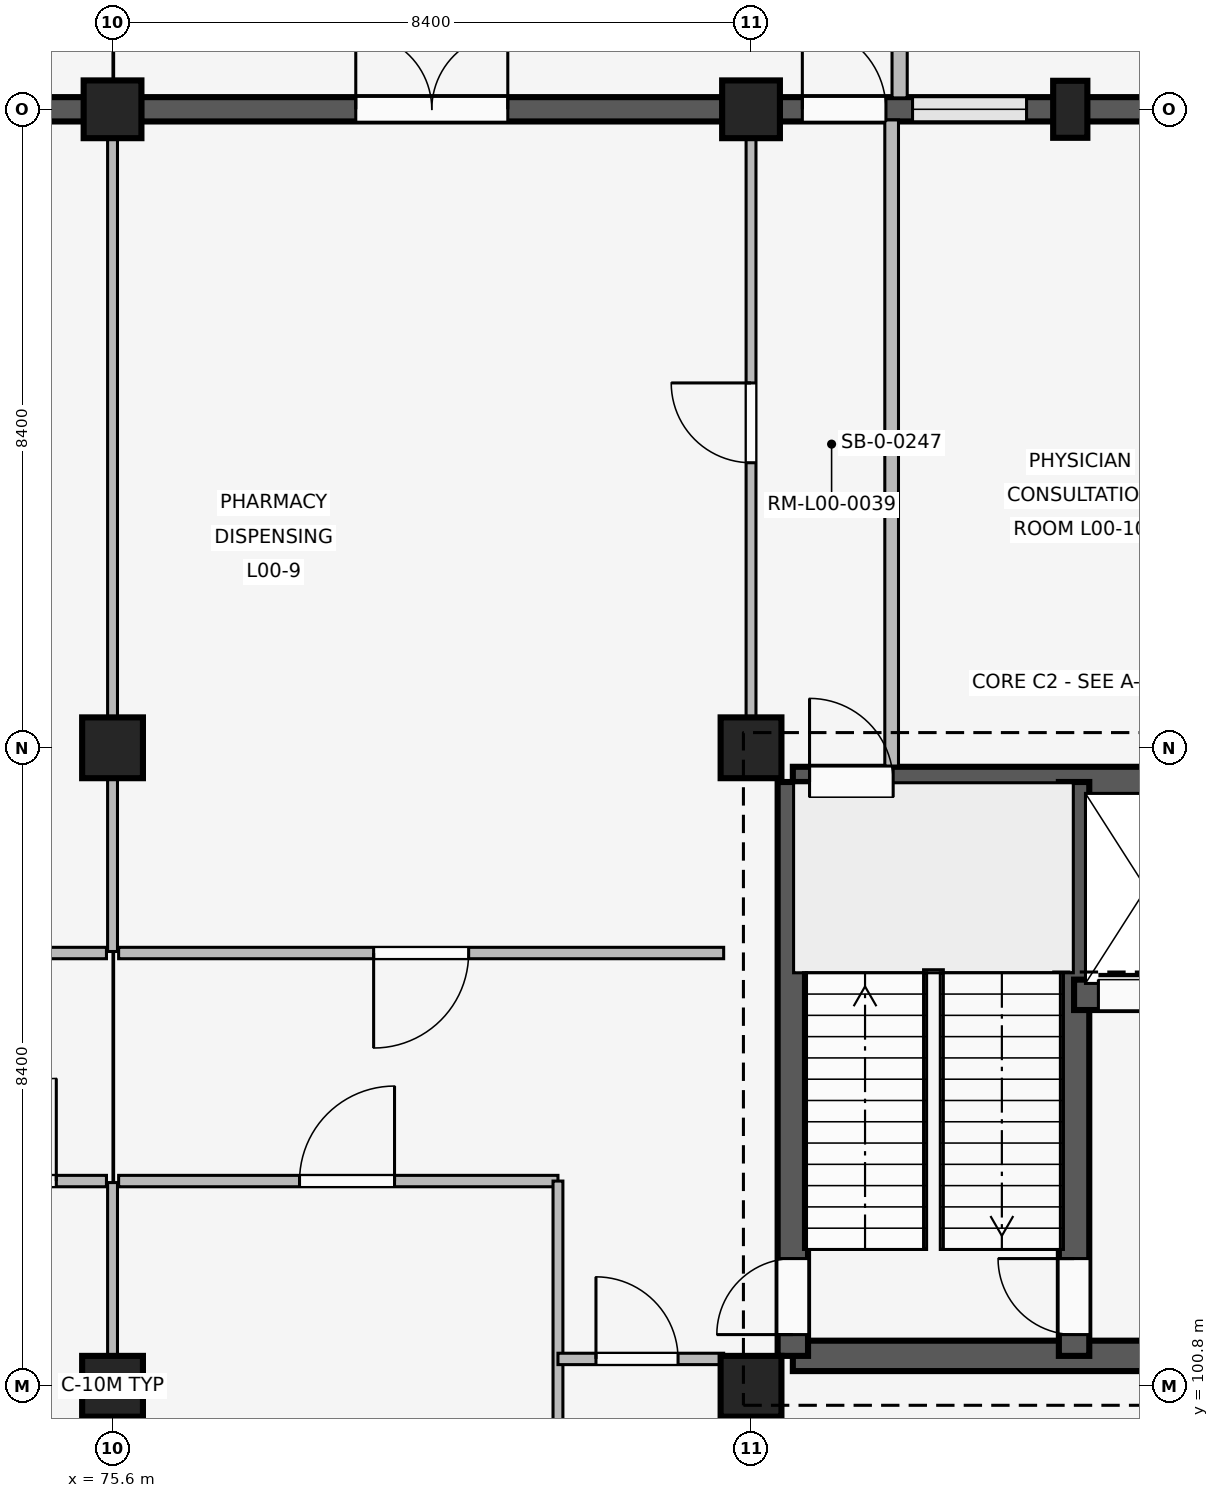
"""IFC4 building model, lengths in metres.
Left out: names, types, materials, properties, quantities, classifications, styles, units other than length and angle.
Written with IfcOpenShell. Run it as: python <this file> out.ifc"""

import sys

from ifc_helpers import new_model, si_unit, direction, frame, frame_2d, origin, origin_2d, place, context, subcontext, project, spatial, rectangle, extrude, element, fill, save


model = new_model("IFC4")
c1 = context("Model", 3, precision=1e-05, world=origin(), true_north=direction((0.0, 1.0)))
c2 = subcontext(c1, "Body", "Model", "MODEL_VIEW")
j1 = project(units=[si_unit("LENGTHUNIT", "METRE"), si_unit("PLANEANGLEUNIT", "RADIAN")], contexts=[c1])
p1 = place(None, origin())
s1 = spatial("IfcSite", under=j1, at=p1, CompositionType="ELEMENT")
p2 = place(p1, origin())
s2 = spatial("IfcBuilding", under=s1, at=p2, CompositionType="ELEMENT")
p3 = place(p2, origin())
s3 = spatial("IfcBuildingStorey", under=s2, at=p3, CompositionType="ELEMENT", Elevation=0.0)
for number, where, z_axis, x_axis in (
    (1, (75.6, 100.8, 0.0), (0.0, 0.0, 1.0), (1.0, 0.0, 0.0)),
    (2, (75.6, 109.2, 0.0), (0.0, 0.0, 1.0), (1.0, 0.0, 0.0)),
):
    element("IfcColumn", number, at=place(p3, frame(where, z_axis=z_axis, x_axis=x_axis)), inside=s3, PredefinedType="COLUMN", context=c2, shape_type="SweptSolid", body=[
        extrude(rectangle(XDim=0.8, YDim=0.8, at=origin_2d()), origin(), (0.0, 0.0, 1.0), 4.8),
    ])
p4 = place(p3, frame((75.6, 117.6, 0.0), z_axis=(0.0, 0.0, 1.0), x_axis=(1.0, 0.0, 0.0)))
e3 = element("IfcColumn", 3, at=p4, inside=s3, PredefinedType="COLUMN", context=c2, shape_type="SweptSolid", body=[
    extrude(rectangle(XDim=0.76, YDim=0.76, at=origin_2d()), origin(), (0.0, 0.0, 1.0), 4.8),
])
for number, where, z_axis, x_axis in (
    (4, (84.0, 100.8, 0.0), (0.0, 0.0, 1.0), (1.0, 0.0, 0.0)),
    (5, (84.0, 109.2, 0.0), (0.0, 0.0, 1.0), (1.0, 0.0, 0.0)),
):
    element("IfcColumn", number, at=place(p3, frame(where, z_axis=z_axis, x_axis=x_axis)), inside=s3, PredefinedType="COLUMN", context=c2, shape_type="SweptSolid", body=[
        extrude(rectangle(XDim=0.8, YDim=0.8, at=origin_2d()), origin(), (0.0, 0.0, 1.0), 4.8),
    ])
p5 = place(p3, frame((84.0, 117.6, 0.0), z_axis=(0.0, 0.0, 1.0), x_axis=(1.0, 0.0, 0.0)))
e6 = element("IfcColumn", 6, at=p5, inside=s3, PredefinedType="COLUMN", context=c2, shape_type="SweptSolid", body=[
    extrude(rectangle(XDim=0.76, YDim=0.76, at=origin_2d()), origin(), (0.0, 0.0, 1.0), 4.8),
])
p6 = place(p3, frame((88.2, 117.6, 0.0), z_axis=(0.0, 0.0, 1.0), x_axis=(1.0, 0.0, 0.0)))
e7 = element("IfcColumn", 7, at=p6, inside=s3, PredefinedType="PILASTER", context=c2, shape_type="SweptSolid", body=[
    extrude(rectangle(XDim=0.45, YDim=0.75, at=origin_2d()), origin(), (0.0, 0.0, 1.0), 4.8),
])
p7 = place(p3, frame((67.575, 117.6, 0.0), z_axis=(0.0, 0.0, 1.0), x_axis=(1.0, 0.0, 0.0)))
e8 = element("IfcWall", 8, at=p7, inside=s3, PredefinedType="SOLIDWALL", context=c2, shape_type="SweptSolid", body=[
    extrude(rectangle(XDim=7.65, YDim=0.32, at=frame_2d((3.825, 0.0))), origin(), (0.0, 0.0, 1.0), 3.82),
])
p8 = place(p7, frame((1.179, 0.0, 0.85)))
e9 = element("IfcOpeningElement", 9, at=p8, cuts=e8, PredefinedType="OPENING", context=c2, shape_type="SweptSolid", body=[
    extrude(rectangle(XDim=1.16, YDim=1.48, at=frame_2d((0.58, 0.74))), frame((0.0, 0.17, 0.0), z_axis=(0.0, -1.0, 0.0), x_axis=(1.0, 0.0, 0.0)), (0.0, 0.0, 1.0), 0.34),
])
p9 = place(p7, frame((5.311, 0.0, 0.85)))
e10 = element("IfcOpeningElement", 10, at=p9, cuts=e8, PredefinedType="OPENING", context=c2, shape_type="SweptSolid", body=[
    extrude(rectangle(XDim=1.16, YDim=1.48, at=frame_2d((0.58, 0.74))), frame((0.0, 0.17, 0.0), z_axis=(0.0, -1.0, 0.0), x_axis=(1.0, 0.0, 0.0)), (0.0, 0.0, 1.0), 0.34),
])
p10 = place(p3, frame((75.975, 117.6, 0.0), z_axis=(0.0, 0.0, 1.0), x_axis=(1.0, 0.0, 0.0)))
e11 = element("IfcWall", 11, at=p10, inside=s3, PredefinedType="SOLIDWALL", context=c2, shape_type="SweptSolid", body=[
    extrude(rectangle(XDim=7.65, YDim=0.32, at=frame_2d((3.825, 0.0))), origin(), (0.0, 0.0, 1.0), 3.82),
])
p11 = place(p10, frame((2.825, 0.0, 0.0)))
e12 = element("IfcOpeningElement", 12, at=p11, cuts=e11, PredefinedType="OPENING", context=c2, shape_type="SweptSolid", body=[
    extrude(rectangle(XDim=2.0, YDim=2.4, at=frame_2d((1.0, 1.2))), frame((0.0, 0.17, 0.0), z_axis=(0.0, -1.0, 0.0), x_axis=(1.0, 0.0, 0.0)), (0.0, 0.0, 1.0), 0.34),
])
p12 = place(p3, frame((84.375, 117.6, 0.0), z_axis=(0.0, 0.0, 1.0), x_axis=(1.0, 0.0, 0.0)))
e13 = element("IfcWall", 13, at=p12, inside=s3, PredefinedType="SOLIDWALL", context=c2, shape_type="SweptSolid", body=[
    extrude(rectangle(XDim=7.65, YDim=0.32, at=frame_2d((3.825, 0.0))), origin(), (0.0, 0.0, 1.0), 3.82),
])
p13 = place(p12, frame((0.3, 0.0, 0.0)))
e14 = element("IfcOpeningElement", 14, at=p13, cuts=e13, PredefinedType="OPENING", context=c2, shape_type="SweptSolid", body=[
    extrude(rectangle(XDim=1.1, YDim=2.15, at=frame_2d((0.55, 1.075))), frame((0.0, 0.17, 0.0), z_axis=(0.0, -1.0, 0.0), x_axis=(1.0, 0.0, 0.0)), (0.0, 0.0, 1.0), 0.34),
])
p14 = place(p12, frame((1.75, 0.0, 0.85)))
e15 = element("IfcOpeningElement", 15, at=p14, cuts=e13, PredefinedType="OPENING", context=c2, shape_type="SweptSolid", body=[
    extrude(rectangle(XDim=1.5, YDim=1.55, at=frame_2d((0.75, 0.775))), frame((0.0, 0.17, 0.0), z_axis=(0.0, -1.0, 0.0), x_axis=(1.0, 0.0, 0.0)), (0.0, 0.0, 1.0), 0.34),
])
p15 = place(p12, frame((5.14, 0.0, 0.85)))
e16 = element("IfcOpeningElement", 16, at=p15, cuts=e13, PredefinedType="OPENING", context=c2, shape_type="SweptSolid", body=[
    extrude(rectangle(XDim=1.5, YDim=1.55, at=frame_2d((0.75, 0.775))), frame((0.0, 0.17, 0.0), z_axis=(0.0, -1.0, 0.0), x_axis=(1.0, 0.0, 0.0)), (0.0, 0.0, 1.0), 0.34),
])
p16 = place(p3, frame((85.955, 117.75, 0.0), z_axis=(0.0, 0.0, 1.0), x_axis=(0.0, 1.0, 0.0)))
e17 = element("IfcWall", 17, at=p16, inside=s3, PredefinedType="ELEMENTEDWALL", context=c2, shape_type="SweptSolid", body=[
    extrude(rectangle(XDim=0.85, YDim=0.2, at=frame_2d((0.425, 0.0))), origin(), (0.0, 0.0, 1.0), 3.8),
])
p17 = place(p3, frame((84.55, 101.2, 0.0), z_axis=(0.0, 0.0, 1.0), x_axis=(1.0, 0.0, 0.0)))
e18 = element("IfcWall", 18, at=p17, inside=s3, PredefinedType="SHEAR", context=c2, shape_type="SweptSolid", body=[
    extrude(rectangle(XDim=7.5, YDim=0.4, at=frame_2d((3.75, 0.0))), origin(), (0.0, 0.0, 1.0), 4.52),
])
p18 = place(p17, frame((4.85, 0.0, 0.0)))
e19 = element("IfcOpeningElement", 19, at=p18, cuts=e18, PredefinedType="OPENING", context=c2, shape_type="SweptSolid", body=[
    extrude(rectangle(XDim=1.2, YDim=2.2, at=frame_2d((0.6, 1.1))), frame((0.0, 0.21, 0.0), z_axis=(0.0, -1.0, 0.0), x_axis=(1.0, 0.0, 0.0)), (0.0, 0.0, 1.0), 0.42),
])
p19 = place(p3, frame((84.55, 108.75, 0.0), z_axis=(0.0, 0.0, 1.0), x_axis=(1.0, 0.0, 0.0)))
e20 = element("IfcWall", 20, at=p19, inside=s3, PredefinedType="SHEAR", context=c2, shape_type="SweptSolid", body=[
    extrude(rectangle(XDim=7.5, YDim=0.4, at=frame_2d((3.75, 0.0))), origin(), (0.0, 0.0, 1.0), 4.52),
])
p20 = place(p19, frame((0.22, 0.0, 0.0)))
e21 = element("IfcOpeningElement", 21, at=p20, cuts=e20, PredefinedType="OPENING", context=c2, shape_type="SweptSolid", body=[
    extrude(rectangle(XDim=1.1, YDim=2.1, at=frame_2d((0.55, 1.05))), frame((0.0, 0.21, 0.0), z_axis=(0.0, -1.0, 0.0), x_axis=(1.0, 0.0, 0.0)), (0.0, 0.0, 1.0), 0.42),
])
p21 = place(p3, frame((84.55, 101.2, 0.0), z_axis=(0.0, 0.0, 1.0), x_axis=(0.0, 1.0, 0.0)))
e22 = element("IfcWall", 22, at=p21, inside=s3, PredefinedType="SHEAR", context=c2, shape_type="SweptSolid", body=[
    extrude(rectangle(XDim=7.55, YDim=0.4, at=frame_2d((3.775, 0.0))), origin(), (0.0, 0.0, 1.0), 4.52),
])
p22 = place(p21, frame((0.28, 0.0, 0.0)))
e23 = element("IfcOpeningElement", 23, at=p22, cuts=e22, PredefinedType="OPENING", context=c2, shape_type="SweptSolid", body=[
    extrude(rectangle(XDim=1.0, YDim=2.15, at=frame_2d((0.5, 1.075))), frame((0.0, 0.21, 0.0), z_axis=(0.0, -1.0, 0.0), x_axis=(1.0, 0.0, 0.0)), (0.0, 0.0, 1.0), 0.42),
])
p23 = place(p3, frame((88.25, 101.2, 0.0), z_axis=(0.0, 0.0, 1.0), x_axis=(0.0, 1.0, 0.0)))
e24 = element("IfcWall", 24, at=p23, inside=s3, PredefinedType="SHEAR", context=c2, shape_type="SweptSolid", body=[
    extrude(rectangle(XDim=7.55, YDim=0.4, at=frame_2d((3.775, 0.0))), origin(), (0.0, 0.0, 1.0), 4.52),
])
p24 = place(p23, frame((0.28, 0.0, 0.0)))
e25 = element("IfcOpeningElement", 25, at=p24, cuts=e24, PredefinedType="OPENING", context=c2, shape_type="SweptSolid", body=[
    extrude(rectangle(XDim=1.0, YDim=2.15, at=frame_2d((0.5, 1.075))), frame((0.0, 0.21, 0.0), z_axis=(0.0, -1.0, 0.0), x_axis=(1.0, 0.0, 0.0)), (0.0, 0.0, 1.0), 0.42),
])
p25 = place(p3, frame((88.25, 105.95, 0.0), z_axis=(0.0, 0.0, 1.0), x_axis=(1.0, 0.0, 0.0)))
e26 = element("IfcWall", 26, at=p25, inside=s3, PredefinedType="SHEAR", context=c2, shape_type="SweptSolid", body=[
    extrude(rectangle(XDim=3.8, YDim=0.4, at=frame_2d((1.9, 0.0))), origin(), (0.0, 0.0, 1.0), 4.52),
])
p26 = place(p25, frame((0.32, 0.0, 0.0)))
e27 = element("IfcOpeningElement", 27, at=p26, cuts=e26, PredefinedType="OPENING", context=c2, shape_type="SweptSolid", body=[
    extrude(rectangle(XDim=1.35, YDim=2.25, at=frame_2d((0.675, 1.125))), frame((0.0, 0.21, 0.0), z_axis=(0.0, -1.0, 0.0), x_axis=(1.0, 0.0, 0.0)), (0.0, 0.0, 1.0), 0.42),
])
p27 = place(p25, frame((2.04, 0.0, 0.0)))
e28 = element("IfcOpeningElement", 28, at=p27, cuts=e26, PredefinedType="OPENING", context=c2, shape_type="SweptSolid", body=[
    extrude(rectangle(XDim=1.4, YDim=2.25, at=frame_2d((0.7, 1.125))), frame((0.0, 0.21, 0.0), z_axis=(0.0, -1.0, 0.0), x_axis=(1.0, 0.0, 0.0)), (0.0, 0.0, 1.0), 0.42),
])
p28 = place(p3, frame((67.28, 103.5, 0.0), z_axis=(0.0, 0.0, 1.0), x_axis=(1.0, 0.0, 0.0)))
e29 = element("IfcWall", 29, at=p28, inside=s3, PredefinedType="PARTITIONING", context=c2, shape_type="SweptSolid", body=[
    extrude(rectangle(XDim=8.24, YDim=0.15, at=frame_2d((4.12, 0.0))), origin(), (0.0, 0.0, 1.0), 3.8),
])
p29 = place(p28, frame((2.53, 0.0, 0.0)))
e30 = element("IfcOpeningElement", 30, at=p29, cuts=e29, PredefinedType="OPENING", context=c2, shape_type="SweptSolid", body=[
    extrude(rectangle(XDim=1.35, YDim=2.25, at=frame_2d((0.675, 1.125))), frame((0.0, 0.085, 0.0), z_axis=(0.0, -1.0, 0.0), x_axis=(1.0, 0.0, 0.0)), (0.0, 0.0, 1.0), 0.17),
])
p30 = place(p28, frame((6.23, 0.0, 0.0)))
e31 = element("IfcOpeningElement", 31, at=p30, cuts=e29, PredefinedType="OPENING", context=c2, shape_type="SweptSolid", body=[
    extrude(rectangle(XDim=1.35, YDim=2.25, at=frame_2d((0.675, 1.125))), frame((0.0, 0.085, 0.0), z_axis=(0.0, -1.0, 0.0), x_axis=(1.0, 0.0, 0.0)), (0.0, 0.0, 1.0), 0.17),
])
p31 = place(p3, frame((75.52, 106.5, 0.0), z_axis=(0.0, 0.0, 1.0), x_axis=(-1.0, 0.0, 0.0)))
e32 = element("IfcWall", 32, at=p31, inside=s3, PredefinedType="PARTITIONING", context=c2, shape_type="SweptSolid", body=[
    extrude(rectangle(XDim=8.24, YDim=0.15, at=frame_2d((4.12, 0.0))), origin(), (0.0, 0.0, 1.0), 3.8),
])
p32 = place(p31, frame((3.545, 0.0, 0.0)))
e33 = element("IfcOpeningElement", 33, at=p32, cuts=e32, PredefinedType="OPENING", context=c2, shape_type="SweptSolid", body=[
    extrude(rectangle(XDim=1.15, YDim=2.2, at=frame_2d((0.575, 1.1))), frame((0.0, 0.085, 0.0), z_axis=(0.0, -1.0, 0.0), x_axis=(1.0, 0.0, 0.0)), (0.0, 0.0, 1.0), 0.17),
])
for number, where, z_axis, x_axis in (
    (34, (75.6, 92.54, 0.0), (0.0, 0.0, 1.0), (0.0, 1.0, 0.0)),
    (35, (75.6, 106.52, 0.0), (0.0, 0.0, 1.0), (0.0, 1.0, 0.0)),
):
    element("IfcWall", number, at=place(p3, frame(where, z_axis=z_axis, x_axis=x_axis)), inside=s3, PredefinedType="PARTITIONING", context=c2, shape_type="SweptSolid", body=[
        extrude(rectangle(XDim=10.94, YDim=0.13, at=frame_2d((5.47, 0.0))), origin(), (0.0, 0.0, 1.0), 3.8),
    ])
p33 = place(p3, frame((75.68, 103.5, 0.0), z_axis=(0.0, 0.0, 1.0), x_axis=(1.0, 0.0, 0.0)))
e36 = element("IfcWall", 36, at=p33, inside=s3, PredefinedType="PARTITIONING", context=c2, shape_type="SweptSolid", body=[
    extrude(rectangle(XDim=5.78, YDim=0.15, at=frame_2d((2.89, 0.0))), origin(), (0.0, 0.0, 1.0), 3.8),
])
p34 = place(p33, frame((2.38, 0.0, 0.0)))
e37 = element("IfcOpeningElement", 37, at=p34, cuts=e36, PredefinedType="OPENING", context=c2, shape_type="SweptSolid", body=[
    extrude(rectangle(XDim=1.25, YDim=2.2, at=frame_2d((0.625, 1.1))), frame((0.0, 0.085, 0.0), z_axis=(0.0, -1.0, 0.0), x_axis=(1.0, 0.0, 0.0)), (0.0, 0.0, 1.0), 0.17),
])
p35 = place(p3, frame((81.46, 92.56, 0.0), z_axis=(0.0, 0.0, 1.0), x_axis=(0.0, 1.0, 0.0)))
e38 = element("IfcWall", 38, at=p35, inside=s3, PredefinedType="PARTITIONING", context=c2, shape_type="SweptSolid", body=[
    extrude(rectangle(XDim=10.94, YDim=0.13, at=frame_2d((5.47, 0.0))), origin(), (0.0, 0.0, 1.0), 3.8),
])
p36 = place(p3, frame((81.46, 101.16, 0.0), z_axis=(0.0, 0.0, 1.0), x_axis=(1.0, 0.0, 0.0)))
e39 = element("IfcWall", 39, at=p36, inside=s3, PredefinedType="PARTITIONING", context=c2, shape_type="SweptSolid", body=[
    extrude(rectangle(XDim=2.18, YDim=0.15, at=frame_2d((1.09, 0.0))), origin(), (0.0, 0.0, 1.0), 3.8),
])
p37 = place(p36, frame((0.5, 0.0, 0.0)))
e40 = element("IfcOpeningElement", 40, at=p37, cuts=e39, PredefinedType="OPENING", context=c2, shape_type="SweptSolid", body=[
    extrude(rectangle(XDim=1.08, YDim=2.15, at=frame_2d((0.54, 1.075))), frame((0.0, 0.085, 0.0), z_axis=(0.0, -1.0, 0.0), x_axis=(1.0, 0.0, 0.0)), (0.0, 0.0, 1.0), 0.17),
])
p38 = place(p3, frame((83.64, 106.5, 0.0), z_axis=(0.0, 0.0, 1.0), x_axis=(-1.0, 0.0, 0.0)))
e41 = element("IfcWall", 41, at=p38, inside=s3, PredefinedType="PARTITIONING", context=c2, shape_type="SweptSolid", body=[
    extrude(rectangle(XDim=7.96, YDim=0.15, at=frame_2d((3.98, 0.0))), origin(), (0.0, 0.0, 1.0), 3.8),
])
p39 = place(p38, frame((3.355, 0.0, 0.0)))
e42 = element("IfcOpeningElement", 42, at=p39, cuts=e41, PredefinedType="OPENING", context=c2, shape_type="SweptSolid", body=[
    extrude(rectangle(XDim=1.25, YDim=2.2, at=frame_2d((0.625, 1.1))), frame((0.0, 0.085, 0.0), z_axis=(0.0, -1.0, 0.0), x_axis=(1.0, 0.0, 0.0)), (0.0, 0.0, 1.0), 0.17),
])
p40 = place(p3, frame((84.0, 92.54, 0.0), z_axis=(0.0, 0.0, 1.0), x_axis=(0.0, 1.0, 0.0)))
e43 = element("IfcWall", 43, at=p40, inside=s3, PredefinedType="PARTITIONING", context=c2, shape_type="SweptSolid", body=[
    extrude(rectangle(XDim=8.21, YDim=0.13, at=frame_2d((4.105, 0.0))), origin(), (0.0, 0.0, 1.0), 3.8),
])
p41 = place(p40, frame((3.64, 0.0, 0.0)))
e44 = element("IfcOpeningElement", 44, at=p41, cuts=e43, PredefinedType="OPENING", context=c2, shape_type="SweptSolid", body=[
    extrude(rectangle(XDim=1.08, YDim=2.15, at=frame_2d((0.54, 1.075))), frame((0.0, 0.075, 0.0), z_axis=(0.0, -1.0, 0.0), x_axis=(1.0, 0.0, 0.0)), (0.0, 0.0, 1.0), 0.15),
])
p42 = place(p3, frame((84.0, 109.55, 0.0), z_axis=(0.0, 0.0, 1.0), x_axis=(0.0, 1.0, 0.0)))
e45 = element("IfcWall", 45, at=p42, inside=s3, PredefinedType="PARTITIONING", context=c2, shape_type="SweptSolid", body=[
    extrude(rectangle(XDim=7.91, YDim=0.13, at=frame_2d((3.955, 0.0))), origin(), (0.0, 0.0, 1.0), 3.8),
])
p43 = place(p42, frame((3.4, 0.0, 0.0)))
e46 = element("IfcOpeningElement", 46, at=p43, cuts=e45, PredefinedType="OPENING", context=c2, shape_type="SweptSolid", body=[
    extrude(rectangle(XDim=1.05, YDim=2.2, at=frame_2d((0.525, 1.1))), frame((0.0, 0.075, 0.0), z_axis=(0.0, -1.0, 0.0), x_axis=(1.0, 0.0, 0.0)), (0.0, 0.0, 1.0), 0.15),
])
p44 = place(p3, frame((85.85, 108.96, 0.0), z_axis=(0.0, 0.0, 1.0), x_axis=(0.0, 1.0, 0.0)))
e47 = element("IfcWall", 47, at=p44, inside=s3, PredefinedType="PARTITIONING", context=c2, shape_type="SweptSolid", body=[
    extrude(rectangle(XDim=8.5, YDim=0.18, at=frame_2d((4.25, 0.0))), origin(), (0.0, 0.0, 1.0), 3.8),
])
p45 = place(p11, origin())
e48 = element("IfcDoor", 48, at=p45, inside=s3, OperationType="DOUBLE_SWING_LEFT", PredefinedType="DOOR", context=c2, shape_type="SweptSolid", body=[
    extrude(rectangle(XDim=2.0, YDim=2.4, at=frame_2d((1.0, 1.2))), frame((0.0, 0.025, 0.0), z_axis=(0.0, -1.0, 0.0), x_axis=(1.0, 0.0, 0.0)), (0.0, 0.0, 1.0), 0.05),
])
fill(e12, e48)
p46 = place(p13, origin())
e49 = element("IfcDoor", 49, at=p46, inside=s3, OperationType="SINGLE_SWING_LEFT", PredefinedType="DOOR", context=c2, shape_type="SweptSolid", body=[
    extrude(rectangle(XDim=1.1, YDim=2.15, at=frame_2d((0.55, 1.075))), frame((0.0, 0.025, 0.0), z_axis=(0.0, -1.0, 0.0), x_axis=(1.0, 0.0, 0.0)), (0.0, 0.0, 1.0), 0.05),
])
fill(e14, e49)
p47 = place(p14, origin())
e50 = element("IfcWindow", 50, at=p47, inside=s3, PartitioningType="SINGLE_PANEL", PredefinedType="WINDOW", context=c2, shape_type="SweptSolid", body=[
    extrude(rectangle(XDim=1.5, YDim=1.55, at=frame_2d((0.75, 0.775))), frame((0.0, 0.03, 0.0), z_axis=(0.0, -1.0, 0.0), x_axis=(1.0, 0.0, 0.0)), (0.0, 0.0, 1.0), 0.06),
])
fill(e15, e50)
p48 = place(p22, origin())
e51 = element("IfcDoor", 51, at=p48, inside=s3, OperationType="SINGLE_SWING_LEFT", PredefinedType="DOOR", context=c2, shape_type="SweptSolid", body=[
    extrude(rectangle(XDim=1.0, YDim=2.15, at=frame_2d((0.5, 1.075))), frame((0.0, 0.025, 0.0), z_axis=(0.0, -1.0, 0.0), x_axis=(1.0, 0.0, 0.0)), (0.0, 0.0, 1.0), 0.05),
])
fill(e23, e51)
p49 = place(p24, origin())
e52 = element("IfcDoor", 52, at=p49, inside=s3, OperationType="SINGLE_SWING_RIGHT", PredefinedType="DOOR", context=c2, shape_type="SweptSolid", body=[
    extrude(rectangle(XDim=1.0, YDim=2.15, at=frame_2d((0.5, 1.075))), frame((0.0, 0.025, 0.0), z_axis=(0.0, -1.0, 0.0), x_axis=(1.0, 0.0, 0.0)), (0.0, 0.0, 1.0), 0.05),
])
fill(e25, e52)
p50 = place(p20, origin())
e53 = element("IfcDoor", 53, at=p50, inside=s3, OperationType="SINGLE_SWING_LEFT", PredefinedType="DOOR", context=c2, shape_type="SweptSolid", body=[
    extrude(rectangle(XDim=1.1, YDim=2.1, at=frame_2d((0.55, 1.05))), frame((0.0, 0.025, 0.0), z_axis=(0.0, -1.0, 0.0), x_axis=(1.0, 0.0, 0.0)), (0.0, 0.0, 1.0), 0.05),
])
fill(e21, e53)
p51 = place(p26, origin())
e54 = element("IfcDoor", 54, at=p51, inside=s3, OperationType="SLIDING_TO_LEFT", PredefinedType="DOOR", context=c2, shape_type="SweptSolid", body=[
    extrude(rectangle(XDim=1.35, YDim=2.25, at=frame_2d((0.675, 1.125))), frame((0.0, 0.025, 0.0), z_axis=(0.0, -1.0, 0.0), x_axis=(1.0, 0.0, 0.0)), (0.0, 0.0, 1.0), 0.05),
])
fill(e27, e54)
p52 = place(p30, origin())
e55 = element("IfcDoor", 55, at=p52, inside=s3, OperationType="SINGLE_SWING_RIGHT", PredefinedType="DOOR", context=c2, shape_type="SweptSolid", body=[
    extrude(rectangle(XDim=1.35, YDim=2.25, at=frame_2d((0.675, 1.125))), frame((0.0, 0.025, 0.0), z_axis=(0.0, -1.0, 0.0), x_axis=(1.0, 0.0, 0.0)), (0.0, 0.0, 1.0), 0.05),
])
fill(e31, e55)
p53 = place(p34, origin())
e56 = element("IfcDoor", 56, at=p53, inside=s3, OperationType="SINGLE_SWING_RIGHT", PredefinedType="DOOR", context=c2, shape_type="SweptSolid", body=[
    extrude(rectangle(XDim=1.25, YDim=2.2, at=frame_2d((0.625, 1.1))), frame((0.0, 0.025, 0.0), z_axis=(0.0, -1.0, 0.0), x_axis=(1.0, 0.0, 0.0)), (0.0, 0.0, 1.0), 0.05),
])
fill(e37, e56)
p54 = place(p37, origin())
e57 = element("IfcDoor", 57, at=p54, inside=s3, OperationType="SINGLE_SWING_LEFT", PredefinedType="DOOR", context=c2, shape_type="SweptSolid", body=[
    extrude(rectangle(XDim=1.08, YDim=2.15, at=frame_2d((0.54, 1.075))), frame((0.0, 0.025, 0.0), z_axis=(0.0, -1.0, 0.0), x_axis=(1.0, 0.0, 0.0)), (0.0, 0.0, 1.0), 0.05),
])
fill(e40, e57)
p55 = place(p39, origin())
e58 = element("IfcDoor", 58, at=p55, inside=s3, OperationType="SINGLE_SWING_RIGHT", PredefinedType="DOOR", context=c2, shape_type="SweptSolid", body=[
    extrude(rectangle(XDim=1.25, YDim=2.2, at=frame_2d((0.625, 1.1))), frame((0.0, 0.025, 0.0), z_axis=(0.0, -1.0, 0.0), x_axis=(1.0, 0.0, 0.0)), (0.0, 0.0, 1.0), 0.05),
])
fill(e42, e58)
p56 = place(p43, origin())
e59 = element("IfcDoor", 59, at=p56, inside=s3, OperationType="SINGLE_SWING_RIGHT", PredefinedType="DOOR", context=c2, shape_type="SweptSolid", body=[
    extrude(rectangle(XDim=1.05, YDim=2.2, at=frame_2d((0.525, 1.1))), frame((0.0, 0.025, 0.0), z_axis=(0.0, -1.0, 0.0), x_axis=(1.0, 0.0, 0.0)), (0.0, 0.0, 1.0), 0.05),
])
fill(e46, e59)
save(model, sys.argv[1])
